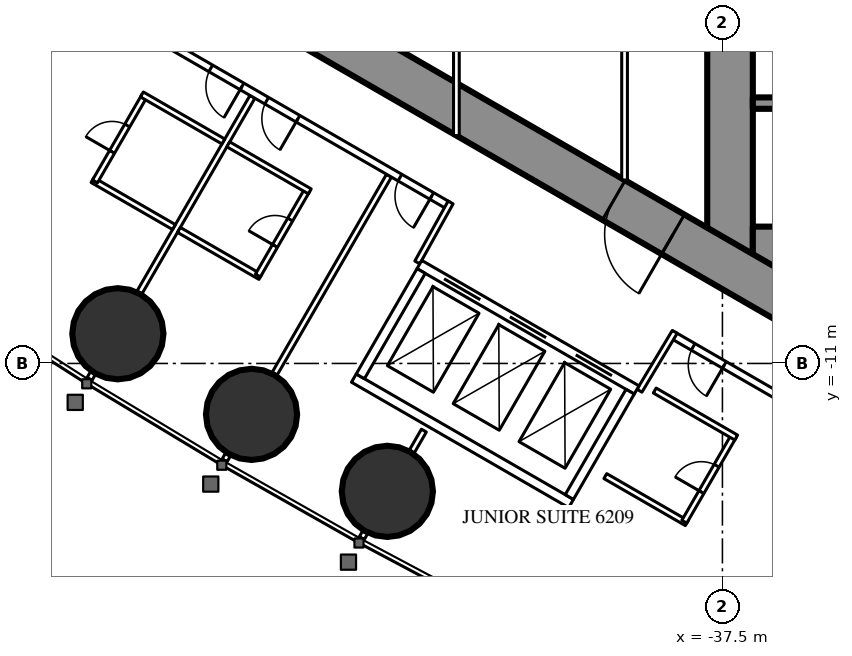
"""IFC4 building model, lengths in metres.
Left out: names, types, materials, properties, quantities, classifications, styles, units other than length and angle.
Written with IfcOpenShell. Run it as: python <this file> out.ifc"""

import sys

from ifc_helpers import new_model, si_unit, direction, frame, frame_2d, origin, origin_2d, place, context, subcontext, project, spatial, rectangle, circle, extrude, element, fill, save


model = new_model("IFC4")
c1 = context("Model", 3, precision=1e-05, world=origin(), true_north=direction((0.0, 1.0)))
c2 = subcontext(c1, "Body", "Model", "MODEL_VIEW")
j1 = project(units=[si_unit("LENGTHUNIT", "METRE"), si_unit("PLANEANGLEUNIT", "RADIAN")], contexts=[c1])
p1 = place(None, origin())
s1 = spatial("IfcSite", under=j1, at=p1, CompositionType="ELEMENT")
p2 = place(p1, origin())
s2 = spatial("IfcBuilding", under=s1, at=p2, CompositionType="ELEMENT")
p3 = place(p2, frame((0.0, 0.0, 233.3)))
s3 = spatial("IfcBuildingStorey", under=s2, at=p3, CompositionType="ELEMENT", Elevation=233.3)
for number, where, z_axis, x_axis in (
    (1, (-53.408, -10.219, 0.0), (0.0, 0.0, 1.0), (1.0, 0.0, 0.0)),
    (2, (-49.89, -12.34, 0.0), (0.0, 0.0, 1.0), (1.0, 0.0, 0.0)),
    (3, (-46.317, -14.365, 0.0), (0.0, 0.0, 1.0), (1.0, 0.0, 0.0)),
):
    element("IfcColumn", number, at=place(p3, frame(where, z_axis=z_axis, x_axis=x_axis)), inside=s3, PredefinedType="COLUMN", context=c2, shape_type="SweptSolid", body=[
        extrude(circle(Radius=1.2, at=origin_2d()), origin(), (0.0, 0.0, 1.0), 3.6),
    ])
p4 = place(p3, frame((-37.3, 8.6, 0.0), z_axis=(0.0, 0.0, 1.0), x_axis=(0.0, -1.0, 0.0)))
e4 = element("IfcWall", 4, at=p4, inside=s3, PredefinedType="SHEAR", context=c2, shape_type="SweptSolid", body=[
    extrude(rectangle(XDim=17.2, YDim=1.2, at=frame_2d((8.6, 0.0))), origin(), (0.0, 0.0, 1.0), 3.6),
])
p5 = place(p4, frame((7.7, 0.0, 0.0)))
e5 = element("IfcOpeningElement", 5, at=p5, cuts=e4, PredefinedType="OPENING", context=c2, shape_type="SweptSolid", body=[
    extrude(rectangle(XDim=1.8, YDim=2.2, at=frame_2d((0.9, 1.1))), frame((0.0, 0.61, 0.0), z_axis=(0.0, -1.0, 0.0), x_axis=(1.0, 0.0, 0.0)), (0.0, 0.0, 1.0), 1.22),
])
p6 = place(p3, frame((-28.3, -8.0, 0.0), z_axis=(0.0, 0.0, 1.0), x_axis=(-1.0, 0.0, 0.0)))
e6 = element("IfcWall", 6, at=p6, inside=s3, PredefinedType="SHEAR", context=c2, shape_type="SweptSolid", body=[
    extrude(rectangle(XDim=8.4, YDim=1.2, at=frame_2d((4.2, 0.0))), origin(), (0.0, 0.0, 1.0), 3.6),
])
p7 = place(p6, frame((0.25, 0.0, 0.0)))
e7 = element("IfcOpeningElement", 7, at=p7, cuts=e6, PredefinedType="OPENING", context=c2, shape_type="SweptSolid", body=[
    extrude(rectangle(XDim=1.0, YDim=2.2, at=frame_2d((0.5, 1.1))), frame((0.0, 0.61, 0.0), z_axis=(0.0, -1.0, 0.0), x_axis=(1.0, 0.0, 0.0)), (0.0, 0.0, 1.0), 1.22),
])
p8 = place(p3, frame((-28.3, -4.15, 0.0), z_axis=(0.0, 0.0, 1.0), x_axis=(-1.0, 0.0, 0.0)))
e8 = element("IfcWall", 8, at=p8, inside=s3, PredefinedType="SHEAR", context=c2, shape_type="SweptSolid", body=[
    extrude(rectangle(XDim=8.4, YDim=0.3, at=frame_2d((4.2, 0.0))), origin(), (0.0, 0.0, 1.0), 3.6),
])
p9 = place(p3, frame((-27.2, -14.3, 0.0), z_axis=(0.0, 0.0, 1.0), x_axis=(-0.866024021859, 0.500002393557, 0.0)))
e9 = element("IfcWall", 9, at=p9, inside=s3, PredefinedType="SHEAR", context=c2, shape_type="SweptSolid", body=[
    extrude(rectangle(XDim=27.907, YDim=1.2, at=frame_2d((13.954, 0.0))), origin(), (0.0, 0.0, 1.0), 3.6),
])
p10 = place(p9, frame((4.6, 0.0, 0.0)))
e10 = element("IfcOpeningElement", 10, at=p10, cuts=e9, PredefinedType="OPENING", context=c2, shape_type="SweptSolid", body=[
    extrude(rectangle(XDim=1.0, YDim=2.2, at=frame_2d((0.5, 1.1))), frame((0.0, 0.61, 0.0), z_axis=(0.0, -1.0, 0.0), x_axis=(1.0, 0.0, 0.0)), (0.0, 0.0, 1.0), 1.22),
])
p11 = place(p9, frame((13.395, 0.0, 0.0)))
e11 = element("IfcOpeningElement", 11, at=p11, cuts=e9, PredefinedType="OPENING", context=c2, shape_type="SweptSolid", body=[
    extrude(rectangle(XDim=1.8, YDim=2.2, at=frame_2d((0.9, 1.1))), frame((0.0, 0.61, 0.0), z_axis=(0.0, -1.0, 0.0), x_axis=(1.0, 0.0, 0.0)), (0.0, 0.0, 1.0), 1.22),
])
p12 = place(p3, frame((-46.898, -15.439, 0.0), z_axis=(0.0, 0.0, 1.0), x_axis=(-0.500232303069, -0.865891241997, 0.0)))
e12 = element("IfcWall", 12, at=p12, inside=s3, PredefinedType="PARTITIONING", context=c2, shape_type="SweptSolid", body=[
    extrude(rectangle(XDim=0.18, YDim=0.15, at=frame_2d((0.09, 0.0))), origin(), (0.0, 0.0, 1.0), 2.45),
])
p13 = place(p3, frame((-46.274, -6.059, 0.0), z_axis=(0.0, 0.0, 1.0), x_axis=(-0.500020471368, -0.866013584312, 0.0)))
e13 = element("IfcWall", 13, at=p13, inside=s3, PredefinedType="PARTITIONING", context=c2, shape_type="SweptSolid", body=[
    extrude(rectangle(XDim=6.028, YDim=0.15, at=frame_2d((3.014, 0.0))), origin(), (0.0, 0.0, 1.0), 2.45),
])
p14 = place(p3, frame((-50.508, -13.392, 0.0), z_axis=(0.0, 0.0, 1.0), x_axis=(-0.499644091975, -0.866230789891, 0.0)))
e14 = element("IfcWall", 14, at=p14, inside=s3, PredefinedType="PARTITIONING", context=c2, shape_type="SweptSolid", body=[
    extrude(rectangle(XDim=0.18, YDim=0.15, at=frame_2d((0.09, 0.0))), origin(), (0.0, 0.0, 1.0), 2.45),
])
p15 = place(p3, frame((-49.866, -3.985, 0.0), z_axis=(0.0, 0.0, 1.0), x_axis=(-0.500000694566, -0.866025002776, 0.0)))
e15 = element("IfcWall", 15, at=p15, inside=s3, PredefinedType="PARTITIONING", context=c2, shape_type="SweptSolid", body=[
    extrude(rectangle(XDim=5.95, YDim=0.15, at=frame_2d((2.975, 0.0))), origin(), (0.0, 0.0, 1.0), 2.45),
])
p16 = place(p3, frame((-54.061, -11.25, 0.0), z_axis=(0.0, 0.0, 1.0), x_axis=(-0.500391173478, -0.865799441849, 0.0)))
e16 = element("IfcWall", 16, at=p16, inside=s3, PredefinedType="PARTITIONING", context=c2, shape_type="SweptSolid", body=[
    extrude(rectangle(XDim=0.179, YDim=0.15, at=frame_2d((0.089, 0.0))), origin(), (0.0, 0.0, 1.0), 2.45),
])
p17 = place(p3, frame((-45.356, -12.767, 0.0), z_axis=(0.0, 0.0, 1.0), x_axis=(-0.499886366516, -0.866091000168, 0.0)))
e17 = element("IfcWall", 17, at=p17, inside=s3, PredefinedType="PARTITIONING", context=c2, shape_type="SweptSolid", body=[
    extrude(rectangle(XDim=0.645, YDim=0.15, at=frame_2d((0.322, 0.0))), origin(), (0.0, 0.0, 1.0), 3.35),
])
p18 = place(p3, frame((-28.737, -16.068, 0.0), z_axis=(0.0, 0.0, 1.0), x_axis=(-0.866029399323, 0.49999307946, 0.0)))
e18 = element("IfcWall", 18, at=p18, inside=s3, PredefinedType="PARTITIONING", context=c2, shape_type="SweptSolid", body=[
    extrude(rectangle(XDim=11.61, YDim=0.2, at=frame_2d((5.805, 0.0))), origin(), (0.0, 0.0, 1.0), 3.35),
])
p19 = place(p18, frame((1.08, 0.0, 0.0)))
e19 = element("IfcOpeningElement", 19, at=p19, cuts=e18, PredefinedType="OPENING", context=c2, shape_type="SweptSolid", body=[
    extrude(rectangle(XDim=1.8, YDim=2.03, at=frame_2d((0.9, 1.015))), frame((0.0, 0.11, 0.0), z_axis=(0.0, -1.0, 0.0), x_axis=(1.0, 0.0, 0.0)), (0.0, 0.0, 1.0), 0.22),
])
p20 = place(p18, frame((10.06, 0.0, 0.0)))
e20 = element("IfcOpeningElement", 20, at=p20, cuts=e18, PredefinedType="OPENING", context=c2, shape_type="SweptSolid", body=[
    extrude(rectangle(XDim=0.95, YDim=2.2, at=frame_2d((0.475, 1.1))), frame((0.0, 0.11, 0.0), z_axis=(0.0, -1.0, 0.0), x_axis=(1.0, 0.0, 0.0)), (0.0, 0.0, 1.0), 0.22),
])
p21 = place(p3, frame((-44.715, -6.844, 0.0), z_axis=(0.0, 0.0, 1.0), x_axis=(-0.866025261224, 0.500000246922, 0.0)))
e21 = element("IfcWall", 21, at=p21, inside=s3, PredefinedType="PARTITIONING", context=c2, shape_type="SweptSolid", body=[
    extrude(rectangle(XDim=13.567, YDim=0.2, at=frame_2d((6.783, 0.0))), origin(), (0.0, 0.0, 1.0), 3.35),
])
p22 = place(p21, frame((6.266, 0.0, 0.0)))
e22 = element("IfcOpeningElement", 22, at=p22, cuts=e21, PredefinedType="OPENING", context=c2, shape_type="SweptSolid", body=[
    extrude(rectangle(XDim=0.95, YDim=2.2, at=frame_2d((0.475, 1.1))), frame((0.0, 0.11, 0.0), z_axis=(0.0, -1.0, 0.0), x_axis=(1.0, 0.0, 0.0)), (0.0, 0.0, 1.0), 0.22),
])
p23 = place(p21, frame((4.565, 0.0, 0.0)))
e23 = element("IfcOpeningElement", 23, at=p23, cuts=e21, PredefinedType="OPENING", context=c2, shape_type="SweptSolid", body=[
    extrude(rectangle(XDim=0.95, YDim=2.2, at=frame_2d((0.475, 1.1))), frame((0.0, 0.11, 0.0), z_axis=(0.0, -1.0, 0.0), x_axis=(1.0, 0.0, 0.0)), (0.0, 0.0, 1.0), 0.22),
])
p24 = place(p21, frame((0.5, 0.0, 0.0)))
e24 = element("IfcOpeningElement", 24, at=p24, cuts=e21, PredefinedType="OPENING", context=c2, shape_type="SweptSolid", body=[
    extrude(rectangle(XDim=0.967, YDim=2.2, at=frame_2d((0.483, 1.1))), frame((0.0, 0.11, 0.0), z_axis=(0.0, -1.0, 0.0), x_axis=(1.0, 0.0, 0.0)), (0.0, 0.0, 1.0), 0.22),
])
for number, where, z_axis, x_axis in (
    (25, (-39.683, -11.718, 0.0), (0.0, 0.0, 1.0), (0.514, 0.858, 0.0)),
    (26, (-44.652, -6.764, 0.0), (0.0, 0.0, 1.0), (-0.485, -0.874, 0.0)),
):
    element("IfcWall", number, at=place(p3, frame(where, z_axis=z_axis, x_axis=x_axis)), inside=s3, PredefinedType="PARTITIONING", context=c2, shape_type="SweptSolid", body=[
        extrude(rectangle(XDim=1.805, YDim=0.15, at=frame_2d((0.903, 0.0))), origin(), (0.0, 0.0, 1.0), 3.35),
    ])
p25 = place(p3, frame((-51.931, -7.411, 0.0), z_axis=(0.0, 0.0, 1.0), x_axis=(-0.866006523861, 0.500032699561, 0.0)))
e27 = element("IfcWall", 27, at=p25, inside=s3, PredefinedType="PARTITIONING", context=c2, shape_type="SweptSolid", body=[
    extrude(rectangle(XDim=2.475, YDim=0.15, at=frame_2d((1.237, 0.0))), origin(), (0.0, 0.0, 1.0), 3.35),
])
p26 = place(p3, frame((-52.71, -3.96, 0.0), z_axis=(0.0, 0.0, 1.0), x_axis=(-0.500006934395, -0.866021400173, 0.0)))
e28 = element("IfcWall", 28, at=p26, inside=s3, PredefinedType="PARTITIONING", context=c2, shape_type="SweptSolid", body=[
    extrude(rectangle(XDim=2.6, YDim=0.15, at=frame_2d((1.3, 0.0))), origin(), (0.0, 0.0, 1.0), 3.35),
])
p27 = place(p26, frame((0.9, 0.0, 0.0)))
e29 = element("IfcOpeningElement", 29, at=p27, cuts=e28, PredefinedType="OPENING", context=c2, shape_type="SweptSolid", body=[
    extrude(rectangle(XDim=0.8, YDim=2.2, at=frame_2d((0.4, 1.1))), frame((0.0, 0.085, 0.0), z_axis=(0.0, -1.0, 0.0), x_axis=(1.0, 0.0, 0.0)), (0.0, 0.0, 1.0), 0.17),
])
p28 = place(p3, frame((-50.631, -5.16, 0.0), z_axis=(0.0, 0.0, 1.0), x_axis=(-0.86604923931, 0.499958713387, 0.0)))
e30 = element("IfcWall", 30, at=p28, inside=s3, PredefinedType="PARTITIONING", context=c2, shape_type="SweptSolid", body=[
    extrude(rectangle(XDim=2.475, YDim=0.15, at=frame_2d((1.237, 0.0))), origin(), (0.0, 0.0, 1.0), 2.5),
])
p29 = place(p3, frame((-49.658, -8.724, 0.0), z_axis=(0.0, 0.0, 1.0), x_axis=(-0.866031185235, 0.4999899861, 0.0)))
e31 = element("IfcWall", 31, at=p29, inside=s3, PredefinedType="PARTITIONING", context=c2, shape_type="SweptSolid", body=[
    extrude(rectangle(XDim=2.475, YDim=0.15, at=frame_2d((1.238, 0.0))), origin(), (0.0, 0.0, 1.0), 3.35),
])
p30 = place(p3, frame((-48.423, -6.435, 0.0), z_axis=(0.0, 0.0, 1.0), x_axis=(-0.500006934395, -0.866021400173, 0.0)))
e32 = element("IfcWall", 32, at=p30, inside=s3, PredefinedType="PARTITIONING", context=c2, shape_type="SweptSolid", body=[
    extrude(rectangle(XDim=2.6, YDim=0.15, at=frame_2d((1.3, 0.0))), origin(), (0.0, 0.0, 1.0), 3.35),
])
p31 = place(p30, frame((0.9, 0.0, 0.0)))
e33 = element("IfcOpeningElement", 33, at=p31, cuts=e32, PredefinedType="OPENING", context=c2, shape_type="SweptSolid", body=[
    extrude(rectangle(XDim=0.8, YDim=2.2, at=frame_2d((0.4, 1.1))), frame((0.0, 0.085, 0.0), z_axis=(0.0, -1.0, 0.0), x_axis=(1.0, 0.0, 0.0)), (0.0, 0.0, 1.0), 0.17),
])
p32 = place(p3, frame((-48.358, -6.472, 0.0), z_axis=(0.0, 0.0, 1.0), x_axis=(-0.866073894602, 0.499916002032, 0.0)))
e34 = element("IfcWall", 34, at=p32, inside=s3, PredefinedType="PARTITIONING", context=c2, shape_type="SweptSolid", body=[
    extrude(rectangle(XDim=2.475, YDim=0.15, at=frame_2d((1.238, 0.0))), origin(), (0.0, 0.0, 1.0), 2.5),
])
p33 = place(p3, frame((-38.438, -15.202, 0.0), z_axis=(0.0, 0.0, 1.0), x_axis=(-0.866073894602, 0.499916002032, 0.0)))
e35 = element("IfcWall", 35, at=p33, inside=s3, PredefinedType="PARTITIONING", context=c2, shape_type="SweptSolid", body=[
    extrude(rectangle(XDim=2.475, YDim=0.15, at=frame_2d((1.238, 0.0))), origin(), (0.0, 0.0, 1.0), 3.35),
])
p34 = place(p3, frame((-37.203, -12.913, 0.0), z_axis=(0.0, 0.0, 1.0), x_axis=(-0.500006934395, -0.866021400173, 0.0)))
e36 = element("IfcWall", 36, at=p34, inside=s3, PredefinedType="PARTITIONING", context=c2, shape_type="SweptSolid", body=[
    extrude(rectangle(XDim=2.6, YDim=0.15, at=frame_2d((1.3, 0.0))), origin(), (0.0, 0.0, 1.0), 3.35),
])
p35 = place(p34, frame((0.9, 0.0, 0.0)))
e37 = element("IfcOpeningElement", 37, at=p35, cuts=e36, PredefinedType="OPENING", context=c2, shape_type="SweptSolid", body=[
    extrude(rectangle(XDim=0.8, YDim=2.2, at=frame_2d((0.4, 1.1))), frame((0.0, 0.085, 0.0), z_axis=(0.0, -1.0, 0.0), x_axis=(1.0, 0.0, 0.0)), (0.0, 0.0, 1.0), 0.17),
])
p36 = place(p3, frame((-37.138, -12.95, 0.0), z_axis=(0.0, 0.0, 1.0), x_axis=(-0.866031185235, 0.4999899861, 0.0)))
e38 = element("IfcWall", 38, at=p36, inside=s3, PredefinedType="PARTITIONING", context=c2, shape_type="SweptSolid", body=[
    extrude(rectangle(XDim=2.475, YDim=0.15, at=frame_2d((1.238, 0.0))), origin(), (0.0, 0.0, 1.0), 2.5),
])
p37 = place(p3, frame((-40.075, 6.174, 0.0), z_axis=(0.0, 0.0, 1.0), x_axis=(0.0, -1.0, 0.0)))
e39 = element("IfcWall", 39, at=p37, inside=s3, PredefinedType="PARTITIONING", context=c2, shape_type="SweptSolid", body=[
    extrude(rectangle(XDim=12.348, YDim=0.15, at=frame_2d((6.174, 0.0))), origin(), (0.0, 0.0, 1.0), 3.35),
])
p38 = place(p37, frame((5.274, 0.0, 0.0)))
e40 = element("IfcOpeningElement", 40, at=p38, cuts=e39, PredefinedType="OPENING", context=c2, shape_type="SweptSolid", body=[
    extrude(rectangle(XDim=1.8, YDim=2.2, at=frame_2d((0.9, 1.1))), frame((0.0, 0.085, 0.0), z_axis=(0.0, -1.0, 0.0), x_axis=(1.0, 0.0, 0.0)), (0.0, 0.0, 1.0), 0.17),
])
p39 = place(p3, frame((-44.5, 5.005, 0.0), z_axis=(0.0, 0.0, 1.0), x_axis=(0.0, -1.0, 0.0)))
e41 = element("IfcWall", 41, at=p39, inside=s3, PredefinedType="PARTITIONING", context=c2, shape_type="SweptSolid", body=[
    extrude(rectangle(XDim=10.009, YDim=0.15, at=frame_2d((5.005, 0.0))), origin(), (0.0, 0.0, 1.0), 2.5),
])
p40 = place(p39, frame((4.505, 0.0, 0.0)))
e42 = element("IfcOpeningElement", 42, at=p40, cuts=e41, PredefinedType="OPENING", context=c2, shape_type="SweptSolid", body=[
    extrude(rectangle(XDim=1.0, YDim=2.2, at=frame_2d((0.5, 1.1))), frame((0.0, 0.085, 0.0), z_axis=(0.0, -1.0, 0.0), x_axis=(1.0, 0.0, 0.0)), (0.0, 0.0, 1.0), 0.17),
])
p41 = place(p3, frame((-39.758, -11.697, 0.0), z_axis=(0.0, 0.0, 1.0), x_axis=(-0.866024194504, 0.500002094529, 0.0)))
e43 = element("IfcWall", 43, at=p41, inside=s3, PredefinedType="PARTITIONING", context=c2, shape_type="SweptSolid", body=[
    extrude(rectangle(XDim=6.6, YDim=0.25, at=frame_2d((3.3, 0.0))), origin(), (0.0, 0.0, 1.0), 3.35),
])
p42 = place(p41, frame((0.75, 0.0, 0.0)))
e44 = element("IfcOpeningElement", 44, at=p42, cuts=e43, PredefinedType="OPENING", context=c2, shape_type="SweptSolid", body=[
    extrude(rectangle(XDim=1.1, YDim=2.2, at=frame_2d((0.55, 1.1))), frame((0.0, 0.135, 0.0), z_axis=(0.0, -1.0, 0.0), x_axis=(1.0, 0.0, 0.0)), (0.0, 0.0, 1.0), 0.27),
])
p43 = place(p41, frame((2.75, 0.0, 0.0)))
e45 = element("IfcOpeningElement", 45, at=p43, cuts=e43, PredefinedType="OPENING", context=c2, shape_type="SweptSolid", body=[
    extrude(rectangle(XDim=1.1, YDim=2.2, at=frame_2d((0.55, 1.1))), frame((0.0, 0.135, 0.0), z_axis=(0.0, -1.0, 0.0), x_axis=(1.0, 0.0, 0.0)), (0.0, 0.0, 1.0), 0.27),
])
p44 = place(p41, frame((4.75, 0.0, 0.0)))
e46 = element("IfcOpeningElement", 46, at=p44, cuts=e43, PredefinedType="OPENING", context=c2, shape_type="SweptSolid", body=[
    extrude(rectangle(XDim=1.1, YDim=2.2, at=frame_2d((0.55, 1.1))), frame((0.0, 0.135, 0.0), z_axis=(0.0, -1.0, 0.0), x_axis=(1.0, 0.0, 0.0)), (0.0, 0.0, 1.0), 0.27),
])
p45 = place(p3, frame((-41.482, -14.686, 0.0), z_axis=(0.0, 0.0, 1.0), x_axis=(-0.86603344179, 0.499986077507, 0.0)))
e47 = element("IfcWall", 47, at=p45, inside=s3, PredefinedType="PARTITIONING", context=c2, shape_type="SweptSolid", body=[
    extrude(rectangle(XDim=6.6, YDim=0.25, at=frame_2d((3.3, 0.0))), origin(), (0.0, 0.0, 1.0), 3.35),
])
for number, where, z_axis, x_axis in (
    (48, (-39.928, -11.743, 0.0), (0.0, 0.0, 1.0), (-0.5, -0.866, 0.0)),
    (49, (-45.428, -8.568, 0.0), (0.0, 0.0, 1.0), (-0.5, -0.866, 0.0)),
):
    element("IfcWall", number, at=place(p3, frame(where, z_axis=z_axis, x_axis=x_axis)), inside=s3, PredefinedType="PARTITIONING", context=c2, shape_type="SweptSolid", body=[
        extrude(rectangle(XDim=3.201, YDim=0.25, at=frame_2d((1.6, 0.0))), origin(), (0.0, 0.0, 1.0), 3.35),
    ])
p46 = place(p27, origin())
e50 = element("IfcDoor", 50, at=p46, inside=s3, OperationType="SINGLE_SWING_RIGHT", PredefinedType="DOOR", context=c2, shape_type="SweptSolid", body=[
    extrude(rectangle(XDim=0.8, YDim=2.2, at=frame_2d((0.4, 1.1))), frame((0.0, 0.025, 0.0), z_axis=(0.0, -1.0, 0.0), x_axis=(1.0, 0.0, 0.0)), (0.0, 0.0, 1.0), 0.05),
])
fill(e29, e50)
p47 = place(p22, origin())
e51 = element("IfcDoor", 51, at=p47, inside=s3, OperationType="SINGLE_SWING_LEFT", PredefinedType="DOOR", context=c2, shape_type="SweptSolid", body=[
    extrude(rectangle(XDim=0.95, YDim=2.2, at=frame_2d((0.475, 1.1))), frame((0.0, 0.025, 0.0), z_axis=(0.0, -1.0, 0.0), x_axis=(1.0, 0.0, 0.0)), (0.0, 0.0, 1.0), 0.05),
])
fill(e22, e51)
p48 = place(p31, origin())
e52 = element("IfcDoor", 52, at=p48, inside=s3, OperationType="SINGLE_SWING_RIGHT", PredefinedType="DOOR", context=c2, shape_type="SweptSolid", body=[
    extrude(rectangle(XDim=0.8, YDim=2.2, at=frame_2d((0.4, 1.1))), frame((0.0, 0.025, 0.0), z_axis=(0.0, -1.0, 0.0), x_axis=(1.0, 0.0, 0.0)), (0.0, 0.0, 1.0), 0.05),
])
fill(e33, e52)
p49 = place(p23, origin())
e53 = element("IfcDoor", 53, at=p49, inside=s3, OperationType="SINGLE_SWING_LEFT", PredefinedType="DOOR", context=c2, shape_type="SweptSolid", body=[
    extrude(rectangle(XDim=0.95, YDim=2.2, at=frame_2d((0.475, 1.1))), frame((0.0, 0.025, 0.0), z_axis=(0.0, -1.0, 0.0), x_axis=(1.0, 0.0, 0.0)), (0.0, 0.0, 1.0), 0.05),
])
fill(e23, e53)
p50 = place(p35, origin())
e54 = element("IfcDoor", 54, at=p50, inside=s3, OperationType="SINGLE_SWING_RIGHT", PredefinedType="DOOR", context=c2, shape_type="SweptSolid", body=[
    extrude(rectangle(XDim=0.8, YDim=2.2, at=frame_2d((0.4, 1.1))), frame((0.0, 0.025, 0.0), z_axis=(0.0, -1.0, 0.0), x_axis=(1.0, 0.0, 0.0)), (0.0, 0.0, 1.0), 0.05),
])
fill(e37, e54)
p51 = place(p20, origin())
e55 = element("IfcDoor", 55, at=p51, inside=s3, OperationType="SINGLE_SWING_LEFT", PredefinedType="DOOR", context=c2, shape_type="SweptSolid", body=[
    extrude(rectangle(XDim=0.95, YDim=2.2, at=frame_2d((0.475, 1.1))), frame((0.0, 0.025, 0.0), z_axis=(0.0, -1.0, 0.0), x_axis=(1.0, 0.0, 0.0)), (0.0, 0.0, 1.0), 0.05),
])
fill(e20, e55)
p52 = place(p24, origin())
e56 = element("IfcDoor", 56, at=p52, inside=s3, OperationType="SINGLE_SWING_LEFT", PredefinedType="DOOR", context=c2, shape_type="SweptSolid", body=[
    extrude(rectangle(XDim=0.967, YDim=2.2, at=frame_2d((0.483, 1.1))), frame((0.0, 0.025, 0.0), z_axis=(0.0, -1.0, 0.0), x_axis=(1.0, 0.0, 0.0)), (0.0, 0.0, 1.0), 0.05),
])
fill(e24, e56)
p53 = place(p11, origin())
e57 = element("IfcDoor", 57, at=p53, inside=s3, OperationType="DOUBLE_DOOR_SINGLE_SWING", PredefinedType="DOOR", context=c2, shape_type="SweptSolid", body=[
    extrude(rectangle(XDim=1.8, YDim=2.2, at=frame_2d((0.9, 1.1))), frame((0.0, 0.025, 0.0), z_axis=(0.0, -1.0, 0.0), x_axis=(1.0, 0.0, 0.0)), (0.0, 0.0, 1.0), 0.05),
])
fill(e11, e57)
p54 = place(p42, origin())
e58 = element("IfcDoor", 58, at=p54, inside=s3, OperationType="DOUBLE_DOOR_SLIDING", PredefinedType="USERDEFINED", context=c2, shape_type="SweptSolid", body=[
    extrude(rectangle(XDim=1.1, YDim=2.2, at=frame_2d((0.55, 1.1))), frame((0.0, 0.025, 0.0), z_axis=(0.0, -1.0, 0.0), x_axis=(1.0, 0.0, 0.0)), (0.0, 0.0, 1.0), 0.05),
])
fill(e44, e58)
p55 = place(p43, origin())
e59 = element("IfcDoor", 59, at=p55, inside=s3, OperationType="DOUBLE_DOOR_SLIDING", PredefinedType="USERDEFINED", context=c2, shape_type="SweptSolid", body=[
    extrude(rectangle(XDim=1.1, YDim=2.2, at=frame_2d((0.55, 1.1))), frame((0.0, 0.025, 0.0), z_axis=(0.0, -1.0, 0.0), x_axis=(1.0, 0.0, 0.0)), (0.0, 0.0, 1.0), 0.05),
])
fill(e45, e59)
p56 = place(p44, origin())
e60 = element("IfcDoor", 60, at=p56, inside=s3, OperationType="DOUBLE_DOOR_SLIDING", PredefinedType="USERDEFINED", context=c2, shape_type="SweptSolid", body=[
    extrude(rectangle(XDim=1.1, YDim=2.2, at=frame_2d((0.55, 1.1))), frame((0.0, 0.025, 0.0), z_axis=(0.0, -1.0, 0.0), x_axis=(1.0, 0.0, 0.0)), (0.0, 0.0, 1.0), 0.05),
])
fill(e46, e60)
save(model, sys.argv[1])
